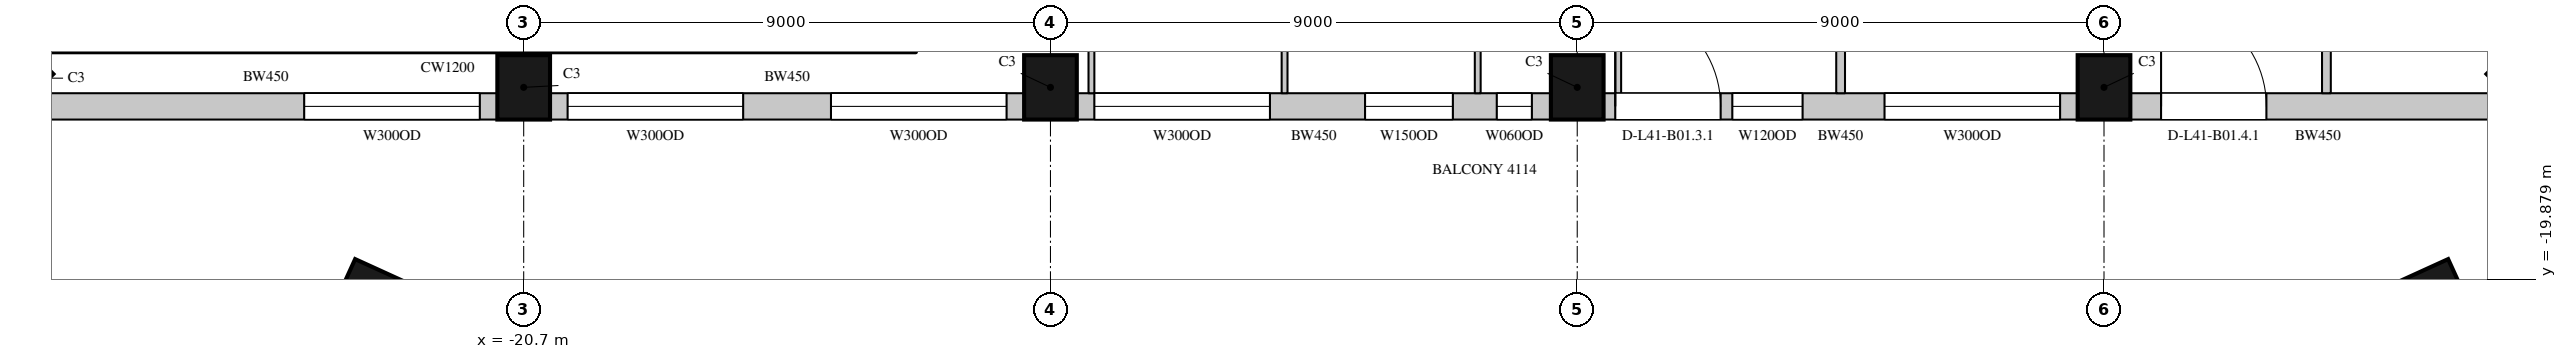
"""IFC4 building model, lengths in metres.
Left out: names, types, materials, properties, quantities, classifications, styles, units other than length and angle.
Written with IfcOpenShell. Run it as: python <this file> out.ifc"""

import sys

from ifc_helpers import new_model, si_unit, direction, frame, frame_2d, origin, origin_2d, place, context, subcontext, project, spatial, rectangle, extrude, element, fill, save


model = new_model("IFC4")
c1 = context("Model", 3, precision=1e-05, world=origin(), true_north=direction((0.0, 1.0)))
c2 = subcontext(c1, "Body", "Model", "MODEL_VIEW")
j1 = project(units=[si_unit("LENGTHUNIT", "METRE"), si_unit("PLANEANGLEUNIT", "RADIAN")], contexts=[c1])
p1 = place(None, origin())
s1 = spatial("IfcSite", under=j1, at=p1, CompositionType="ELEMENT")
p2 = place(p1, origin())
s2 = spatial("IfcBuilding", under=s1, at=p2, CompositionType="ELEMENT")
p3 = place(p2, frame((0.0, 0.0, 189.2)))
s3 = spatial("IfcBuildingStorey", under=s2, at=p3, CompositionType="ELEMENT", Elevation=189.2)
for number, where, z_axis, x_axis in (
    (1, (-29.443, -16.443, 0.0), (0.0, 0.0, 1.0), (0.707, -0.707, 0.0)),
    (2, (-20.7, -16.6, 0.0), (0.0, 0.0, 1.0), (1.0, 0.0, 0.0)),
    (3, (-11.7, -16.6, 0.0), (0.0, 0.0, 1.0), (1.0, 0.0, 0.0)),
    (4, (-2.7, -16.6, 0.0), (0.0, 0.0, 1.0), (1.0, 0.0, 0.0)),
    (5, (6.3, -16.6, 0.0), (0.0, 0.0, 1.0), (1.0, 0.0, 0.0)),
    (6, (13.543, -16.443, 0.0), (0.0, 0.0, 1.0), (0.707, 0.707, 0.0)),
    (7, (-23.398, -20.221, 0.0), (0.0, 0.0, 1.0), (0.91, -0.415, 0.0)),
    (8, (11.998, -20.221, 0.0), (0.0, 0.0, 1.0), (0.91, 0.415, 0.0)),
):
    element("IfcColumn", number, at=place(p3, frame(where, z_axis=z_axis, x_axis=x_axis)), inside=s3, PredefinedType="COLUMN", context=c2, shape_type="SweptSolid", body=[
        extrude(rectangle(XDim=0.9, YDim=1.1, at=origin_2d()), origin(), (0.0, 0.0, 1.0), 4.1),
    ])
p4 = place(p3, frame((-29.064, -16.925, 0.0), z_axis=(0.0, 0.0, 1.0), x_axis=(1.0, 0.0, 0.0)))
e9 = element("IfcWall", 9, at=p4, inside=s3, PredefinedType="SOLIDWALL", context=c2, shape_type="SweptSolid", body=[
    extrude(rectangle(XDim=7.914, YDim=0.45, at=frame_2d((3.957, 0.0))), origin(), (0.0, 0.0, 1.0), 3.8),
])
p5 = place(p4, frame((4.614, 0.0, 1.05)))
e10 = element("IfcOpeningElement", 10, at=p5, cuts=e9, PredefinedType="OPENING", context=c2, shape_type="SweptSolid", body=[
    extrude(rectangle(XDim=3.0, YDim=2.4, at=frame_2d((1.5, 1.2))), frame((0.0, 0.235, 0.0), z_axis=(0.0, -1.0, 0.0), x_axis=(1.0, 0.0, 0.0)), (0.0, 0.0, 1.0), 0.47),
])
p6 = place(p3, frame((-20.25, -16.925, 0.0), z_axis=(0.0, 0.0, 1.0), x_axis=(1.0, 0.0, 0.0)))
e11 = element("IfcWall", 11, at=p6, inside=s3, PredefinedType="SOLIDWALL", context=c2, shape_type="SweptSolid", body=[
    extrude(rectangle(XDim=8.1, YDim=0.45, at=frame_2d((4.05, 0.0))), origin(), (0.0, 0.0, 1.0), 3.8),
])
p7 = place(p6, frame((0.3, 0.0, 1.05)))
e12 = element("IfcOpeningElement", 12, at=p7, cuts=e11, PredefinedType="OPENING", context=c2, shape_type="SweptSolid", body=[
    extrude(rectangle(XDim=3.0, YDim=2.4, at=frame_2d((1.5, 1.2))), frame((0.0, 0.235, 0.0), z_axis=(0.0, -1.0, 0.0), x_axis=(1.0, 0.0, 0.0)), (0.0, 0.0, 1.0), 0.47),
])
p8 = place(p6, frame((4.8, 0.0, 1.05)))
e13 = element("IfcOpeningElement", 13, at=p8, cuts=e11, PredefinedType="OPENING", context=c2, shape_type="SweptSolid", body=[
    extrude(rectangle(XDim=3.0, YDim=2.4, at=frame_2d((1.5, 1.2))), frame((0.0, 0.235, 0.0), z_axis=(0.0, -1.0, 0.0), x_axis=(1.0, 0.0, 0.0)), (0.0, 0.0, 1.0), 0.47),
])
p9 = place(p3, frame((-11.25, -16.925, 0.0), z_axis=(0.0, 0.0, 1.0), x_axis=(1.0, 0.0, 0.0)))
e14 = element("IfcWall", 14, at=p9, inside=s3, PredefinedType="SOLIDWALL", context=c2, shape_type="SweptSolid", body=[
    extrude(rectangle(XDim=8.1, YDim=0.45, at=frame_2d((4.05, 0.0))), origin(), (0.0, 0.0, 1.0), 3.8),
])
p10 = place(p9, frame((0.3, 0.0, 1.05)))
e15 = element("IfcOpeningElement", 15, at=p10, cuts=e14, PredefinedType="OPENING", context=c2, shape_type="SweptSolid", body=[
    extrude(rectangle(XDim=3.0, YDim=2.4, at=frame_2d((1.5, 1.2))), frame((0.0, 0.235, 0.0), z_axis=(0.0, -1.0, 0.0), x_axis=(1.0, 0.0, 0.0)), (0.0, 0.0, 1.0), 0.47),
])
p11 = place(p9, frame((4.925, 0.0, 1.05)))
e16 = element("IfcOpeningElement", 16, at=p11, cuts=e14, PredefinedType="OPENING", context=c2, shape_type="SweptSolid", body=[
    extrude(rectangle(XDim=1.5, YDim=2.4, at=frame_2d((0.75, 1.2))), frame((0.0, 0.235, 0.0), z_axis=(0.0, -1.0, 0.0), x_axis=(1.0, 0.0, 0.0)), (0.0, 0.0, 1.0), 0.47),
])
p12 = place(p9, frame((7.175, 0.0, 1.05)))
e17 = element("IfcOpeningElement", 17, at=p12, cuts=e14, PredefinedType="OPENING", context=c2, shape_type="SweptSolid", body=[
    extrude(rectangle(XDim=0.6, YDim=2.4, at=frame_2d((0.3, 1.2))), frame((0.0, 0.235, 0.0), z_axis=(0.0, -1.0, 0.0), x_axis=(1.0, 0.0, 0.0)), (0.0, 0.0, 1.0), 0.47),
])
p13 = place(p3, frame((-2.25, -16.925, 0.0), z_axis=(0.0, 0.0, 1.0), x_axis=(1.0, 0.0, 0.0)))
e18 = element("IfcWall", 18, at=p13, inside=s3, PredefinedType="SOLIDWALL", context=c2, shape_type="SweptSolid", body=[
    extrude(rectangle(XDim=8.1, YDim=0.45, at=frame_2d((4.05, 0.0))), origin(), (0.0, 0.0, 1.0), 3.8),
])
p14 = place(p13, frame((0.2, 0.0, 0.0)))
e19 = element("IfcOpeningElement", 19, at=p14, cuts=e18, PredefinedType="OPENING", context=c2, shape_type="SweptSolid", body=[
    extrude(rectangle(XDim=1.8, YDim=2.4, at=frame_2d((0.9, 1.2))), frame((0.0, 0.235, 0.0), z_axis=(0.0, -1.0, 0.0), x_axis=(1.0, 0.0, 0.0)), (0.0, 0.0, 1.0), 0.47),
])
p15 = place(p13, frame((2.2, 0.0, 1.05)))
e20 = element("IfcOpeningElement", 20, at=p15, cuts=e18, PredefinedType="OPENING", context=c2, shape_type="SweptSolid", body=[
    extrude(rectangle(XDim=1.2, YDim=2.4, at=frame_2d((0.6, 1.2))), frame((0.0, 0.235, 0.0), z_axis=(0.0, -1.0, 0.0), x_axis=(1.0, 0.0, 0.0)), (0.0, 0.0, 1.0), 0.47),
])
p16 = place(p13, frame((4.8, 0.0, 1.05)))
e21 = element("IfcOpeningElement", 21, at=p16, cuts=e18, PredefinedType="OPENING", context=c2, shape_type="SweptSolid", body=[
    extrude(rectangle(XDim=3.0, YDim=2.4, at=frame_2d((1.5, 1.2))), frame((0.0, 0.235, 0.0), z_axis=(0.0, -1.0, 0.0), x_axis=(1.0, 0.0, 0.0)), (0.0, 0.0, 1.0), 0.47),
])
p17 = place(p3, frame((6.75, -16.925, 0.0), z_axis=(0.0, 0.0, 1.0), x_axis=(1.0, 0.0, 0.0)))
e22 = element("IfcWall", 22, at=p17, inside=s3, PredefinedType="SOLIDWALL", context=c2, shape_type="SweptSolid", body=[
    extrude(rectangle(XDim=6.414, YDim=0.45, at=frame_2d((3.207, 0.0))), origin(), (0.0, 0.0, 1.0), 3.8),
])
p18 = place(p17, frame((0.525, 0.0, 0.0)))
e23 = element("IfcOpeningElement", 23, at=p18, cuts=e22, PredefinedType="OPENING", context=c2, shape_type="SweptSolid", body=[
    extrude(rectangle(XDim=1.8, YDim=2.4, at=frame_2d((0.9, 1.2))), frame((0.0, 0.235, 0.0), z_axis=(0.0, -1.0, 0.0), x_axis=(1.0, 0.0, 0.0)), (0.0, 0.0, 1.0), 0.47),
])
p19 = place(p3, frame((1.8, -16.7, 0.0), z_axis=(0.0, 0.0, 1.0), x_axis=(0.0, 1.0, 0.0)))
e24 = element("IfcWall", 24, at=p19, inside=s3, PredefinedType="PARTITIONING", context=c2, shape_type="SweptSolid", body=[
    extrude(rectangle(XDim=5.5, YDim=0.15, at=frame_2d((2.75, 0.0))), origin(), (0.0, 0.0, 1.0), 3.15),
])
p20 = place(p3, frame((10.1, -16.7, 0.0), z_axis=(0.0, 0.0, 1.0), x_axis=(0.0, 1.0, 0.0)))
e25 = element("IfcWall", 25, at=p20, inside=s3, PredefinedType="PARTITIONING", context=c2, shape_type="SweptSolid", body=[
    extrude(rectangle(XDim=5.6, YDim=0.15, at=frame_2d((2.8, 0.0))), origin(), (0.0, 0.0, 1.0), 3.8),
])
p21 = place(p3, frame((-11.0, -16.7, 0.0), z_axis=(0.0, 0.0, 1.0), x_axis=(0.0, 1.0, 0.0)))
e26 = element("IfcWall", 26, at=p21, inside=s3, PredefinedType="PARTITIONING", context=c2, shape_type="SweptSolid", body=[
    extrude(rectangle(XDim=1.88, YDim=0.1, at=frame_2d((0.94, 0.0))), origin(), (0.0, 0.0, 1.0), 3.8),
])
for number, where, z_axis, x_axis in (
    (27, (-7.7, -16.7, 0.0), (0.0, 0.0, 1.0), (0.0, 1.0, 0.0)),
    (28, (-4.4, -16.7, 0.0), (0.0, 0.0, 1.0), (0.0, 1.0, 0.0)),
    (29, (-2.0, -16.7, 0.0), (0.0, 0.0, 1.0), (0.0, 1.0, 0.0)),
):
    element("IfcWall", number, at=place(p3, frame(where, z_axis=z_axis, x_axis=x_axis)), inside=s3, PredefinedType="PARTITIONING", context=c2, shape_type="SweptSolid", body=[
        extrude(rectangle(XDim=5.5, YDim=0.1, at=frame_2d((2.75, 0.0))), origin(), (0.0, 0.0, 1.0), 3.8),
    ])
p22 = place(p5, origin())
e30 = element("IfcWindow", 30, at=p22, inside=s3, PartitioningType="SINGLE_PANEL", PredefinedType="WINDOW", context=c2, shape_type="SweptSolid", body=[
    extrude(rectangle(XDim=3.0, YDim=2.4, at=frame_2d((1.5, 1.2))), frame((0.0, 0.135, 0.0), z_axis=(0.0, -1.0, 0.0), x_axis=(1.0, 0.0, 0.0)), (0.0, 0.0, 1.0), 0.06),
])
fill(e10, e30)
p23 = place(p7, origin())
e31 = element("IfcWindow", 31, at=p23, inside=s3, PartitioningType="SINGLE_PANEL", PredefinedType="WINDOW", context=c2, shape_type="SweptSolid", body=[
    extrude(rectangle(XDim=3.0, YDim=2.4, at=frame_2d((1.5, 1.2))), frame((0.0, 0.135, 0.0), z_axis=(0.0, -1.0, 0.0), x_axis=(1.0, 0.0, 0.0)), (0.0, 0.0, 1.0), 0.06),
])
fill(e12, e31)
p24 = place(p8, origin())
e32 = element("IfcWindow", 32, at=p24, inside=s3, PartitioningType="SINGLE_PANEL", PredefinedType="WINDOW", context=c2, shape_type="SweptSolid", body=[
    extrude(rectangle(XDim=3.0, YDim=2.4, at=frame_2d((1.5, 1.2))), frame((0.0, 0.135, 0.0), z_axis=(0.0, -1.0, 0.0), x_axis=(1.0, 0.0, 0.0)), (0.0, 0.0, 1.0), 0.06),
])
fill(e13, e32)
p25 = place(p10, origin())
e33 = element("IfcWindow", 33, at=p25, inside=s3, PartitioningType="SINGLE_PANEL", PredefinedType="WINDOW", context=c2, shape_type="SweptSolid", body=[
    extrude(rectangle(XDim=3.0, YDim=2.4, at=frame_2d((1.5, 1.2))), frame((0.0, 0.135, 0.0), z_axis=(0.0, -1.0, 0.0), x_axis=(1.0, 0.0, 0.0)), (0.0, 0.0, 1.0), 0.06),
])
fill(e15, e33)
p26 = place(p14, origin())
e34 = element("IfcDoor", 34, at=p26, inside=s3, OperationType="SLIDING_TO_LEFT", PredefinedType="DOOR", context=c2, shape_type="SweptSolid", body=[
    extrude(rectangle(XDim=1.8, YDim=2.4, at=frame_2d((0.9, 1.2))), frame((0.0, 0.13, 0.0), z_axis=(0.0, -1.0, 0.0), x_axis=(1.0, 0.0, 0.0)), (0.0, 0.0, 1.0), 0.05),
])
fill(e19, e34)
p27 = place(p15, origin())
e35 = element("IfcWindow", 35, at=p27, inside=s3, PartitioningType="SINGLE_PANEL", PredefinedType="WINDOW", context=c2, shape_type="SweptSolid", body=[
    extrude(rectangle(XDim=1.2, YDim=2.4, at=frame_2d((0.6, 1.2))), frame((0.0, 0.135, 0.0), z_axis=(0.0, -1.0, 0.0), x_axis=(1.0, 0.0, 0.0)), (0.0, 0.0, 1.0), 0.06),
])
fill(e20, e35)
p28 = place(p16, origin())
e36 = element("IfcWindow", 36, at=p28, inside=s3, PartitioningType="SINGLE_PANEL", PredefinedType="WINDOW", context=c2, shape_type="SweptSolid", body=[
    extrude(rectangle(XDim=3.0, YDim=2.4, at=frame_2d((1.5, 1.2))), frame((0.0, 0.135, 0.0), z_axis=(0.0, -1.0, 0.0), x_axis=(1.0, 0.0, 0.0)), (0.0, 0.0, 1.0), 0.06),
])
fill(e21, e36)
p29 = place(p18, origin())
e37 = element("IfcDoor", 37, at=p29, inside=s3, OperationType="SLIDING_TO_LEFT", PredefinedType="DOOR", context=c2, shape_type="SweptSolid", body=[
    extrude(rectangle(XDim=1.8, YDim=2.4, at=frame_2d((0.9, 1.2))), frame((0.0, 0.13, 0.0), z_axis=(0.0, -1.0, 0.0), x_axis=(1.0, 0.0, 0.0)), (0.0, 0.0, 1.0), 0.05),
])
fill(e23, e37)
p30 = place(p11, origin())
e38 = element("IfcWindow", 38, at=p30, inside=s3, PartitioningType="SINGLE_PANEL", PredefinedType="WINDOW", context=c2, shape_type="SweptSolid", body=[
    extrude(rectangle(XDim=1.5, YDim=2.4, at=frame_2d((0.75, 1.2))), frame((0.0, 0.135, 0.0), z_axis=(0.0, -1.0, 0.0), x_axis=(1.0, 0.0, 0.0)), (0.0, 0.0, 1.0), 0.06),
])
fill(e16, e38)
p31 = place(p12, origin())
e39 = element("IfcWindow", 39, at=p31, inside=s3, PartitioningType="SINGLE_PANEL", PredefinedType="WINDOW", context=c2, shape_type="SweptSolid", body=[
    extrude(rectangle(XDim=0.6, YDim=2.4, at=frame_2d((0.3, 1.2))), frame((0.0, 0.135, 0.0), z_axis=(0.0, -1.0, 0.0), x_axis=(1.0, 0.0, 0.0)), (0.0, 0.0, 1.0), 0.06),
])
fill(e17, e39)
save(model, sys.argv[1])
